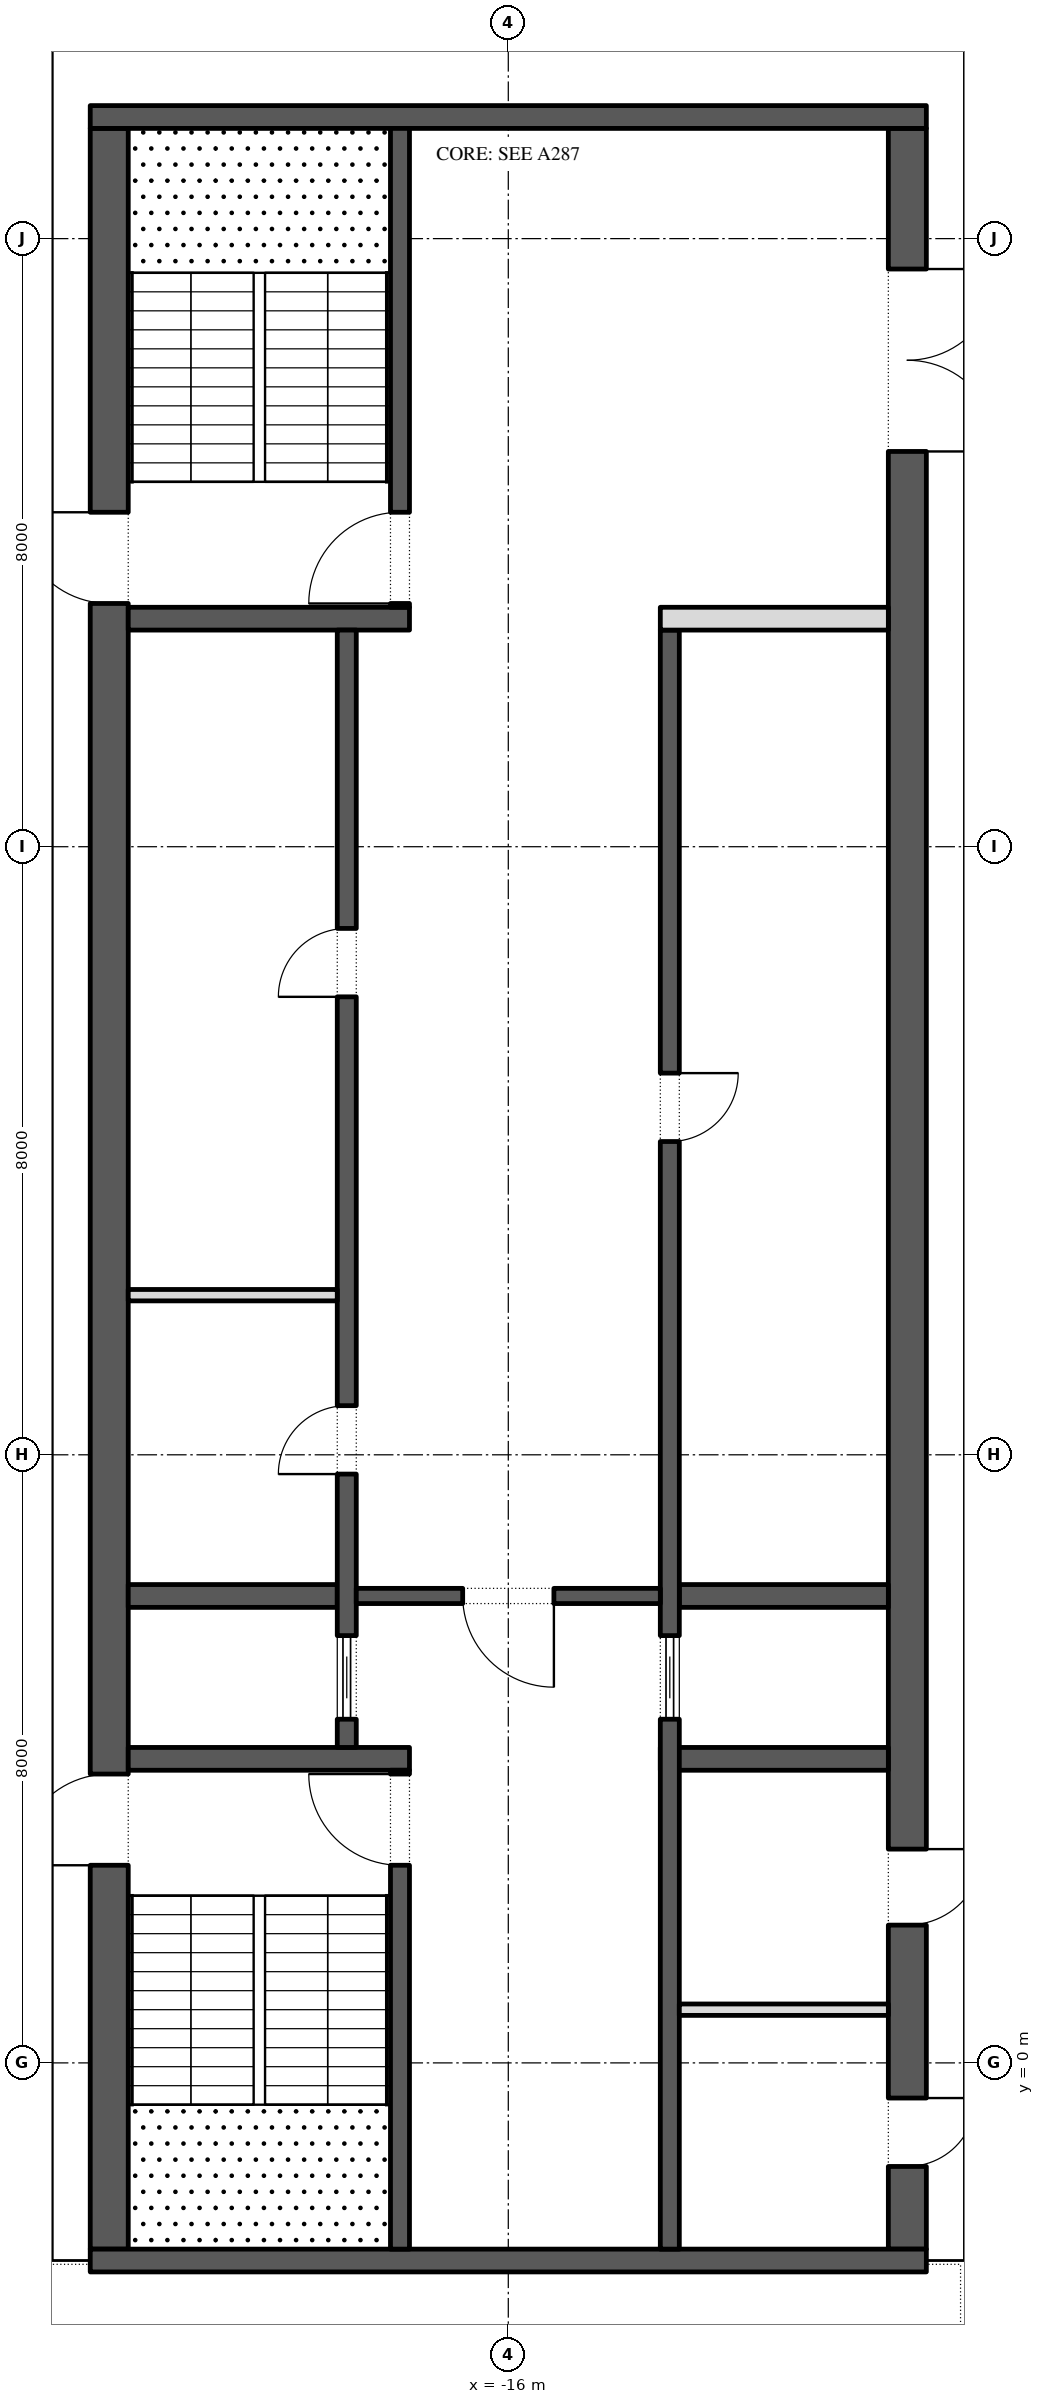
"""IFC4 building model, lengths in metres.
Left out: names, types, materials, properties, quantities, classifications, styles, units other than length and angle.
Written with IfcOpenShell. Run it as: python <this file> out.ifc"""

import sys

from ifc_helpers import new_model, si_unit, direction, frame, frame_2d, origin, place, context, subcontext, project, spatial, rectangle, extrude, element, fill, save


model = new_model("IFC4")
c1 = context("Model", 3, precision=1e-05, world=origin(), true_north=direction((0.0, 1.0)))
c2 = subcontext(c1, "Body", "Model", "MODEL_VIEW")
j1 = project(units=[si_unit("LENGTHUNIT", "METRE"), si_unit("PLANEANGLEUNIT", "RADIAN")], contexts=[c1])
p1 = place(None, origin())
s1 = spatial("IfcSite", under=j1, at=p1, CompositionType="ELEMENT")
p2 = place(p1, origin())
s2 = spatial("IfcBuilding", under=s1, at=p2, CompositionType="ELEMENT")
p3 = place(p2, frame((0.0, 0.0, 381.6)))
s3 = spatial("IfcBuildingStorey", under=s2, at=p3, CompositionType="ELEMENT", Elevation=381.6)
p4 = place(p3, frame((-21.25, -2.45, 0.0), z_axis=(0.0, 0.0, 1.0), x_axis=(0.0, 1.0, 0.0)))
e1 = element("IfcWall", 1, at=p4, inside=s3, PredefinedType="SHEAR", context=c2, shape_type="SweptSolid", body=[
    extrude(rectangle(XDim=27.9, YDim=0.5, at=frame_2d((13.95, 0.0))), origin(), (0.0, 0.0, 1.0), 4.0),
])
p5 = place(p4, frame((5.05, 0.0, 0.0)))
e2 = element("IfcOpeningElement", 2, at=p5, cuts=e1, PredefinedType="OPENING", context=c2, shape_type="SweptSolid", body=[
    extrude(rectangle(XDim=1.2, YDim=2.1, at=frame_2d((0.6, 1.05))), frame((0.0, 0.26, 0.0), z_axis=(0.0, -1.0, 0.0), x_axis=(1.0, 0.0, 0.0)), (0.0, 0.0, 1.0), 0.52),
])
p6 = place(p4, frame((21.65, 0.0, 0.0)))
e3 = element("IfcOpeningElement", 3, at=p6, cuts=e1, PredefinedType="OPENING", context=c2, shape_type="SweptSolid", body=[
    extrude(rectangle(XDim=1.2, YDim=2.1, at=frame_2d((0.6, 1.05))), frame((0.0, 0.26, 0.0), z_axis=(0.0, -1.0, 0.0), x_axis=(1.0, 0.0, 0.0)), (0.0, 0.0, 1.0), 0.52),
])
p7 = place(p3, frame((-10.75, -2.45, 0.0), z_axis=(0.0, 0.0, 1.0), x_axis=(0.0, 1.0, 0.0)))
e4 = element("IfcWall", 4, at=p7, inside=s3, PredefinedType="SHEAR", context=c2, shape_type="SweptSolid", body=[
    extrude(rectangle(XDim=27.9, YDim=0.5, at=frame_2d((13.95, 0.0))), origin(), (0.0, 0.0, 1.0), 4.0),
])
p8 = place(p7, frame((23.65, 0.0, 0.0)))
e5 = element("IfcOpeningElement", 5, at=p8, cuts=e4, PredefinedType="OPENING", context=c2, shape_type="SweptSolid", body=[
    extrude(rectangle(XDim=2.4, YDim=2.1, at=frame_2d((1.2, 1.05))), frame((0.0, 0.26, 0.0), z_axis=(0.0, -1.0, 0.0), x_axis=(1.0, 0.0, 0.0)), (0.0, 0.0, 1.0), 0.52),
])
p9 = place(p7, frame((1.087, 0.0, 0.0)))
e6 = element("IfcOpeningElement", 6, at=p9, cuts=e4, PredefinedType="OPENING", context=c2, shape_type="SweptSolid", body=[
    extrude(rectangle(XDim=0.9, YDim=2.1, at=frame_2d((0.45, 1.05))), frame((0.0, 0.26, 0.0), z_axis=(0.0, -1.0, 0.0), x_axis=(1.0, 0.0, 0.0)), (0.0, 0.0, 1.0), 0.52),
])
p10 = place(p7, frame((4.262, 0.0, 0.0)))
e7 = element("IfcOpeningElement", 7, at=p10, cuts=e4, PredefinedType="OPENING", context=c2, shape_type="SweptSolid", body=[
    extrude(rectangle(XDim=1.0, YDim=2.1, at=frame_2d((0.5, 1.05))), frame((0.0, 0.26, 0.0), z_axis=(0.0, -1.0, 0.0), x_axis=(1.0, 0.0, 0.0)), (0.0, 0.0, 1.0), 0.52),
])
for number, where, z_axis, x_axis in (
    (8, (-21.5, -2.6, 0.0), (0.0, 0.0, 1.0), (1.0, 0.0, 0.0)),
    (9, (-21.5, 25.6, 0.0), (0.0, 0.0, 1.0), (1.0, 0.0, 0.0)),
):
    element("IfcWall", number, at=place(p3, frame(where, z_axis=z_axis, x_axis=x_axis)), inside=s3, PredefinedType="SHEAR", context=c2, shape_type="SweptSolid", body=[
        extrude(rectangle(XDim=11.0, YDim=0.3, at=frame_2d((5.5, 0.0))), origin(), (0.0, 0.0, 1.0), 4.0),
    ])
p11 = place(p3, frame((-21.0, 4.0, 0.0), z_axis=(0.0, 0.0, 1.0), x_axis=(1.0, 0.0, 0.0)))
e10 = element("IfcWall", 10, at=p11, inside=s3, PredefinedType="SHEAR", context=c2, shape_type="SweptSolid", body=[
    extrude(rectangle(XDim=3.7, YDim=0.3, at=frame_2d((1.85, 0.0))), origin(), (0.0, 0.0, 1.0), 4.0),
])
p12 = place(p3, frame((-17.425, -2.45, 0.0), z_axis=(0.0, 0.0, 1.0), x_axis=(0.0, 1.0, 0.0)))
e11 = element("IfcWall", 11, at=p12, inside=s3, PredefinedType="SHEAR", context=c2, shape_type="SweptSolid", body=[
    extrude(rectangle(XDim=6.3, YDim=0.25, at=frame_2d((3.15, 0.0))), origin(), (0.0, 0.0, 1.0), 4.0),
])
p13 = place(p12, frame((5.05, 0.0, 0.0)))
e12 = element("IfcOpeningElement", 12, at=p13, cuts=e11, PredefinedType="OPENING", context=c2, shape_type="SweptSolid", body=[
    extrude(rectangle(XDim=1.2, YDim=2.1, at=frame_2d((0.6, 1.05))), frame((0.0, 0.135, 0.0), z_axis=(0.0, -1.0, 0.0), x_axis=(1.0, 0.0, 0.0)), (0.0, 0.0, 1.0), 0.27),
])
p14 = place(p3, frame((-21.0, 19.0, 0.0), z_axis=(0.0, 0.0, 1.0), x_axis=(1.0, 0.0, 0.0)))
e13 = element("IfcWall", 13, at=p14, inside=s3, PredefinedType="SHEAR", context=c2, shape_type="SweptSolid", body=[
    extrude(rectangle(XDim=3.7, YDim=0.3, at=frame_2d((1.85, 0.0))), origin(), (0.0, 0.0, 1.0), 4.0),
])
p15 = place(p3, frame((-17.425, 19.15, 0.0), z_axis=(0.0, 0.0, 1.0), x_axis=(0.0, 1.0, 0.0)))
e14 = element("IfcWall", 14, at=p15, inside=s3, PredefinedType="SHEAR", context=c2, shape_type="SweptSolid", body=[
    extrude(rectangle(XDim=6.3, YDim=0.25, at=frame_2d((3.15, 0.0))), origin(), (0.0, 0.0, 1.0), 4.0),
])
p16 = place(p15, frame((0.05, 0.0, 0.0)))
e15 = element("IfcOpeningElement", 15, at=p16, cuts=e14, PredefinedType="OPENING", context=c2, shape_type="SweptSolid", body=[
    extrude(rectangle(XDim=1.2, YDim=2.1, at=frame_2d((0.6, 1.05))), frame((0.0, 0.135, 0.0), z_axis=(0.0, -1.0, 0.0), x_axis=(1.0, 0.0, 0.0)), (0.0, 0.0, 1.0), 0.27),
])
p17 = place(p3, frame((-21.0, 6.143, 0.0), z_axis=(0.0, 0.0, 1.0), x_axis=(1.0, 0.0, 0.0)))
e16 = element("IfcWall", 16, at=p17, inside=s3, PredefinedType="SHEAR", context=c2, shape_type="SweptSolid", body=[
    extrude(rectangle(XDim=2.75, YDim=0.3, at=frame_2d((1.375, 0.0))), origin(), (0.0, 0.0, 1.0), 4.0),
])
p18 = place(p3, frame((-18.125, 4.15, 0.0), z_axis=(0.0, 0.0, 1.0), x_axis=(0.0, 1.0, 0.0)))
e17 = element("IfcWall", 17, at=p18, inside=s3, PredefinedType="SHEAR", context=c2, shape_type="SweptSolid", body=[
    extrude(rectangle(XDim=14.7, YDim=0.25, at=frame_2d((7.35, 0.0))), origin(), (0.0, 0.0, 1.0), 4.0),
])
p19 = place(p18, frame((3.596, 0.0, 0.0)))
e18 = element("IfcOpeningElement", 18, at=p19, cuts=e17, PredefinedType="OPENING", context=c2, shape_type="SweptSolid", body=[
    extrude(rectangle(XDim=0.9, YDim=2.1, at=frame_2d((0.45, 1.05))), frame((0.0, 0.135, 0.0), z_axis=(0.0, -1.0, 0.0), x_axis=(1.0, 0.0, 0.0)), (0.0, 0.0, 1.0), 0.27),
])
p20 = place(p18, frame((9.875, 0.0, 0.0)))
e19 = element("IfcOpeningElement", 19, at=p20, cuts=e17, PredefinedType="OPENING", context=c2, shape_type="SweptSolid", body=[
    extrude(rectangle(XDim=0.9, YDim=2.1, at=frame_2d((0.45, 1.05))), frame((0.0, 0.135, 0.0), z_axis=(0.0, -1.0, 0.0), x_axis=(1.0, 0.0, 0.0)), (0.0, 0.0, 1.0), 0.27),
])
p21 = place(p18, frame((0.371, 0.0, 0.0)))
e20 = element("IfcOpeningElement", 20, at=p21, cuts=e17, PredefinedType="OPENING", context=c2, shape_type="SweptSolid", body=[
    extrude(rectangle(XDim=1.1, YDim=2.1, at=frame_2d((0.55, 1.05))), frame((0.0, 0.135, 0.0), z_axis=(0.0, -1.0, 0.0), x_axis=(1.0, 0.0, 0.0)), (0.0, 0.0, 1.0), 0.27),
])
p22 = place(p3, frame((-21.0, 10.1, 0.0), z_axis=(0.0, 0.0, 1.0), x_axis=(1.0, 0.0, 0.0)))
e21 = element("IfcWall", 21, at=p22, inside=s3, PredefinedType="PARTITIONING", context=c2, shape_type="SweptSolid", body=[
    extrude(rectangle(XDim=2.75, YDim=0.15, at=frame_2d((1.375, 0.0))), origin(), (0.0, 0.0, 1.0), 4.0),
])
p23 = place(p3, frame((-14.0, 4.0, 0.0), z_axis=(0.0, 0.0, 1.0), x_axis=(1.0, 0.0, 0.0)))
e22 = element("IfcWall", 22, at=p23, inside=s3, PredefinedType="SHEAR", context=c2, shape_type="SweptSolid", body=[
    extrude(rectangle(XDim=3.0, YDim=0.3, at=frame_2d((1.5, 0.0))), origin(), (0.0, 0.0, 1.0), 4.0),
])
p24 = place(p3, frame((-13.75, 6.143, 0.0), z_axis=(0.0, 0.0, 1.0), x_axis=(1.0, 0.0, 0.0)))
e23 = element("IfcWall", 23, at=p24, inside=s3, PredefinedType="SHEAR", context=c2, shape_type="SweptSolid", body=[
    extrude(rectangle(XDim=2.75, YDim=0.3, at=frame_2d((1.375, 0.0))), origin(), (0.0, 0.0, 1.0), 4.0),
])
p25 = place(p3, frame((-13.875, -2.45, 0.0), z_axis=(0.0, 0.0, 1.0), x_axis=(0.0, 1.0, 0.0)))
e24 = element("IfcWall", 24, at=p25, inside=s3, PredefinedType="SHEAR", context=c2, shape_type="SweptSolid", body=[
    extrude(rectangle(XDim=21.3, YDim=0.25, at=frame_2d((10.65, 0.0))), origin(), (0.0, 0.0, 1.0), 4.0),
])
p26 = place(p25, frame((14.571, 0.0, 0.0)))
e25 = element("IfcOpeningElement", 25, at=p26, cuts=e24, PredefinedType="OPENING", context=c2, shape_type="SweptSolid", body=[
    extrude(rectangle(XDim=0.9, YDim=2.1, at=frame_2d((0.45, 1.05))), frame((0.0, 0.135, 0.0), z_axis=(0.0, -1.0, 0.0), x_axis=(1.0, 0.0, 0.0)), (0.0, 0.0, 1.0), 0.27),
])
p27 = place(p25, frame((6.971, 0.0, 0.0)))
e26 = element("IfcOpeningElement", 26, at=p27, cuts=e24, PredefinedType="OPENING", context=c2, shape_type="SweptSolid", body=[
    extrude(rectangle(XDim=1.1, YDim=2.1, at=frame_2d((0.55, 1.05))), frame((0.0, 0.135, 0.0), z_axis=(0.0, -1.0, 0.0), x_axis=(1.0, 0.0, 0.0)), (0.0, 0.0, 1.0), 0.27),
])
p28 = place(p3, frame((-14.0, 19.0, 0.0), z_axis=(0.0, 0.0, 1.0), x_axis=(1.0, 0.0, 0.0)))
e27 = element("IfcWall", 27, at=p28, inside=s3, PredefinedType="PARTITIONING", context=c2, shape_type="SweptSolid", body=[
    extrude(rectangle(XDim=3.0, YDim=0.3, at=frame_2d((1.5, 0.0))), origin(), (0.0, 0.0, 1.0), 4.0),
])
p29 = place(p3, frame((-18.0, 6.143, 0.0), z_axis=(0.0, 0.0, 1.0), x_axis=(1.0, 0.0, 0.0)))
e28 = element("IfcWall", 28, at=p29, inside=s3, PredefinedType="SHEAR", context=c2, shape_type="SweptSolid", body=[
    extrude(rectangle(XDim=4.0, YDim=0.2, at=frame_2d((2.0, 0.0))), origin(), (0.0, 0.0, 1.0), 4.0),
])
p30 = place(p29, frame((1.4, 0.0, 0.0)))
e29 = element("IfcOpeningElement", 29, at=p30, cuts=e28, PredefinedType="OPENING", context=c2, shape_type="SweptSolid", body=[
    extrude(rectangle(XDim=1.2, YDim=2.1, at=frame_2d((0.6, 1.05))), frame((0.0, 0.11, 0.0), z_axis=(0.0, -1.0, 0.0), x_axis=(1.0, 0.0, 0.0)), (0.0, 0.0, 1.0), 0.22),
])
p31 = place(p3, frame((-13.75, 0.7, 0.0), z_axis=(0.0, 0.0, 1.0), x_axis=(1.0, 0.0, 0.0)))
e30 = element("IfcWall", 30, at=p31, inside=s3, PredefinedType="PARTITIONING", context=c2, shape_type="SweptSolid", body=[
    extrude(rectangle(XDim=2.75, YDim=0.15, at=frame_2d((1.375, 0.0))), origin(), (0.0, 0.0, 1.0), 4.0),
])
p32 = place(p19, origin())
e31 = element("IfcDoor", 31, at=p32, inside=s3, OperationType="SINGLE_SWING_RIGHT", PredefinedType="DOOR", context=c2, shape_type="SweptSolid", body=[
    extrude(rectangle(XDim=0.9, YDim=2.1, at=frame_2d((0.45, 1.05))), frame((0.0, 0.125, 0.0), z_axis=(0.0, -1.0, 0.0), x_axis=(1.0, 0.0, 0.0)), (0.0, 0.0, 1.0), 0.05),
])
fill(e18, e31)
p33 = place(p20, origin())
e32 = element("IfcDoor", 32, at=p33, inside=s3, OperationType="SINGLE_SWING_RIGHT", PredefinedType="DOOR", context=c2, shape_type="SweptSolid", body=[
    extrude(rectangle(XDim=0.9, YDim=2.1, at=frame_2d((0.45, 1.05))), frame((0.0, 0.125, 0.0), z_axis=(0.0, -1.0, 0.0), x_axis=(1.0, 0.0, 0.0)), (0.0, 0.0, 1.0), 0.05),
])
fill(e19, e32)
p34 = place(p21, origin())
e33 = element("IfcDoor", 33, at=p34, inside=s3, OperationType="SLIDING_TO_LEFT", PredefinedType="DOOR", context=c2, shape_type="SweptSolid", body=[
    extrude(rectangle(XDim=1.1, YDim=2.1, at=frame_2d((0.55, 1.05))), frame((0.0, 0.025, 0.0), z_axis=(0.0, -1.0, 0.0), x_axis=(1.0, 0.0, 0.0)), (0.0, 0.0, 1.0), 0.05),
])
fill(e20, e33)
p35 = place(p26, frame((0.9, -0.2, 0.0), z_axis=(0.0, 0.0, 1.0), x_axis=(-1.0, 0.0, 0.0)))
e34 = element("IfcDoor", 34, at=p35, inside=s3, OperationType="SINGLE_SWING_RIGHT", PredefinedType="DOOR", context=c2, shape_type="SweptSolid", body=[
    extrude(rectangle(XDim=0.9, YDim=2.1, at=frame_2d((0.45, 1.05))), frame((0.0, -0.075, 0.0), z_axis=(0.0, -1.0, 0.0), x_axis=(1.0, 0.0, 0.0)), (0.0, 0.0, 1.0), 0.05),
])
fill(e25, e34)
p36 = place(p27, origin())
e35 = element("IfcDoor", 35, at=p36, inside=s3, OperationType="SLIDING_TO_LEFT", PredefinedType="DOOR", context=c2, shape_type="SweptSolid", body=[
    extrude(rectangle(XDim=1.1, YDim=2.1, at=frame_2d((0.55, 1.05))), frame((0.0, 0.025, 0.0), z_axis=(0.0, -1.0, 0.0), x_axis=(1.0, 0.0, 0.0)), (0.0, 0.0, 1.0), 0.05),
])
fill(e26, e35)
p37 = place(p30, frame((1.2, 0.0, 0.0), z_axis=(0.0, 0.0, 1.0), x_axis=(-1.0, 0.0, 0.0)))
e36 = element("IfcDoor", 36, at=p37, inside=s3, OperationType="SINGLE_SWING_RIGHT", PredefinedType="DOOR", context=c2, shape_type="SweptSolid", body=[
    extrude(rectangle(XDim=1.2, YDim=2.1, at=frame_2d((0.6, 1.05))), frame((0.0, 0.025, 0.0), z_axis=(0.0, -1.0, 0.0), x_axis=(1.0, 0.0, 0.0)), (0.0, 0.0, 1.0), 0.05),
])
fill(e29, e36)
p38 = place(p8, frame((2.4, 0.0, 0.0), z_axis=(0.0, 0.0, 1.0), x_axis=(-1.0, 0.0, 0.0)))
e37 = element("IfcDoor", 37, at=p38, inside=s3, OperationType="DOUBLE_DOOR_SINGLE_SWING", PredefinedType="DOOR", context=c2, shape_type="SweptSolid", body=[
    extrude(rectangle(XDim=2.4, YDim=2.1, at=frame_2d((1.2, 1.05))), frame((0.0, 0.025, 0.0), z_axis=(0.0, -1.0, 0.0), x_axis=(1.0, 0.0, 0.0)), (0.0, 0.0, 1.0), 0.05),
])
fill(e5, e37)
p39 = place(p13, origin())
e38 = element("IfcDoor", 38, at=p39, inside=s3, OperationType="SINGLE_SWING_LEFT", PredefinedType="DOOR", context=c2, shape_type="SweptSolid", body=[
    extrude(rectangle(XDim=1.2, YDim=2.1, at=frame_2d((0.6, 1.05))), frame((0.0, 0.025, 0.0), z_axis=(0.0, -1.0, 0.0), x_axis=(1.0, 0.0, 0.0)), (0.0, 0.0, 1.0), 0.05),
])
fill(e12, e38)
p40 = place(p5, origin())
e39 = element("IfcDoor", 39, at=p40, inside=s3, OperationType="SINGLE_SWING_RIGHT", PredefinedType="DOOR", context=c2, shape_type="SweptSolid", body=[
    extrude(rectangle(XDim=1.2, YDim=2.1, at=frame_2d((0.6, 1.05))), frame((0.0, 0.025, 0.0), z_axis=(0.0, -1.0, 0.0), x_axis=(1.0, 0.0, 0.0)), (0.0, 0.0, 1.0), 0.05),
])
fill(e2, e39)
p41 = place(p16, origin())
e40 = element("IfcDoor", 40, at=p41, inside=s3, OperationType="SINGLE_SWING_RIGHT", PredefinedType="DOOR", context=c2, shape_type="SweptSolid", body=[
    extrude(rectangle(XDim=1.2, YDim=2.1, at=frame_2d((0.6, 1.05))), frame((0.0, 0.025, 0.0), z_axis=(0.0, -1.0, 0.0), x_axis=(1.0, 0.0, 0.0)), (0.0, 0.0, 1.0), 0.05),
])
fill(e15, e40)
p42 = place(p6, origin())
e41 = element("IfcDoor", 41, at=p42, inside=s3, OperationType="SINGLE_SWING_LEFT", PredefinedType="DOOR", context=c2, shape_type="SweptSolid", body=[
    extrude(rectangle(XDim=1.2, YDim=2.1, at=frame_2d((0.6, 1.05))), frame((0.0, 0.025, 0.0), z_axis=(0.0, -1.0, 0.0), x_axis=(1.0, 0.0, 0.0)), (0.0, 0.0, 1.0), 0.05),
])
fill(e3, e41)
p43 = place(p9, frame((0.9, 0.45, 0.0), z_axis=(0.0, 0.0, 1.0), x_axis=(-1.0, 0.0, 0.0)))
e42 = element("IfcDoor", 42, at=p43, inside=s3, OperationType="SINGLE_SWING_RIGHT", PredefinedType="DOOR", context=c2, shape_type="SweptSolid", body=[
    extrude(rectangle(XDim=0.9, YDim=2.1, at=frame_2d((0.45, 1.05))), frame((0.0, 0.25, 0.0), z_axis=(0.0, -1.0, 0.0), x_axis=(1.0, 0.0, 0.0)), (0.0, 0.0, 1.0), 0.05),
])
fill(e6, e42)
p44 = place(p10, frame((1.0, 0.45, 0.0), z_axis=(0.0, 0.0, 1.0), x_axis=(-1.0, 0.0, 0.0)))
e43 = element("IfcDoor", 43, at=p44, inside=s3, OperationType="SINGLE_SWING_RIGHT", PredefinedType="DOOR", context=c2, shape_type="SweptSolid", body=[
    extrude(rectangle(XDim=1.0, YDim=2.1, at=frame_2d((0.5, 1.05))), frame((0.0, 0.25, 0.0), z_axis=(0.0, -1.0, 0.0), x_axis=(1.0, 0.0, 0.0)), (0.0, 0.0, 1.0), 0.05),
])
fill(e7, e43)
save(model, sys.argv[1])
